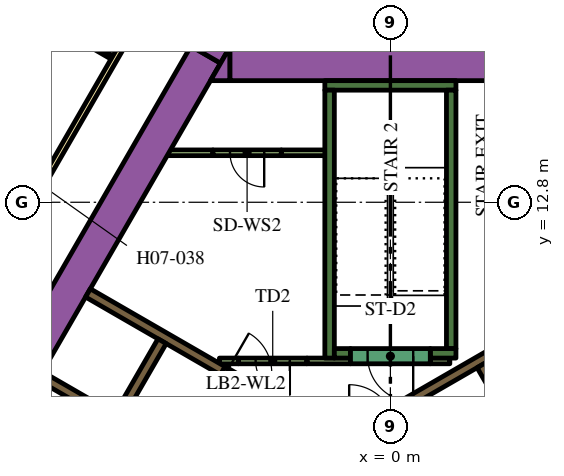
"""IFC4 building model, lengths in metres.
Left out: names, types, materials, properties, quantities, classifications, styles, units other than length and angle.
Written with IfcOpenShell. Run it as: python <this file> out.ifc"""

import sys

from ifc_helpers import new_model, si_unit, direction, frame, frame_2d, origin, place, context, subcontext, project, spatial, polyline, rectangle, outline, extrude, element, fill, save


model = new_model("IFC4")
c1 = context("Model", 3, precision=1e-05, world=origin(), true_north=direction((0.0, 1.0)))
c2 = subcontext(c1, "Body", "Model", "MODEL_VIEW")
j1 = project(units=[si_unit("LENGTHUNIT", "METRE"), si_unit("PLANEANGLEUNIT", "RADIAN")], contexts=[c1])
p1 = place(None, origin())
s1 = spatial("IfcSite", under=j1, at=p1, CompositionType="ELEMENT")
p2 = place(p1, origin())
s2 = spatial("IfcBuilding", under=s1, at=p2, CompositionType="ELEMENT")
p3 = place(p2, frame((0.0, 0.0, 99.3)))
s3 = spatial("IfcBuildingStorey", under=s2, at=p3, CompositionType="ELEMENT", Elevation=99.3)
p4 = place(p3, frame((-15.36, -1.503, 0.0), z_axis=(0.0, 0.0, 1.0), x_axis=(0.50000389221, 0.866023156604, 0.0)))
e1 = element("IfcWall", 1, at=p4, inside=s3, PredefinedType="SOLIDWALL", context=c2, shape_type="SweptSolid", body=[
    extrude(rectangle(XDim=21.0, YDim=0.9, at=frame_2d((10.5, 0.0))), origin(), (0.0, 0.0, 1.0), 3.9),
])
p5 = place(p3, origin())
e2 = element("IfcWall", 2, at=p5, inside=s3, PredefinedType="SOLIDWALL", context=c2, shape_type="SweptSolid", body=[
    extrude(outline(polyline([(-4.215, 16.9), (-4.469, 16.46), (-5.231, 16.9), (-4.215, 16.9)])), origin(), (0.0, 0.0, 1.0), 3.9),
])
p6 = place(p3, frame((-4.224, 16.45, 0.0), z_axis=(0.0, 0.0, 1.0), x_axis=(1.0, 0.0, 0.0)))
e3 = element("IfcWall", 3, at=p6, inside=s3, PredefinedType="SOLIDWALL", context=c2, shape_type="SweptSolid", body=[
    extrude(rectangle(XDim=9.488, YDim=0.9, at=frame_2d((4.744, 0.0))), origin(), (0.0, 0.0, 1.0), 3.9),
])
e4 = element("IfcWall", 4, at=p5, inside=s3, PredefinedType="SOLIDWALL", context=c2, shape_type="SweptSolid", body=[
    extrude(outline(polyline([(-4.734, 16.0), (-4.226, 16.88), (-4.226, 16.0), (-4.734, 16.0)])), origin(), (0.0, 0.0, 1.0), 3.9),
])
p7 = place(p3, frame((-1.725, 15.875, 0.0), z_axis=(0.0, 0.0, 1.0), x_axis=(1.0, 0.0, 0.0)))
e5 = element("IfcWall", 5, at=p7, inside=s3, PredefinedType="SOLIDWALL", context=c2, shape_type="SweptSolid", body=[
    extrude(rectangle(XDim=3.45, YDim=0.25, at=frame_2d((1.725, 0.0))), origin(), (0.0, 0.0, 1.0), 3.9),
])
p8 = place(p3, frame((1.6, 8.95, 0.0), z_axis=(0.0, 0.0, 1.0), x_axis=(0.0, 1.0, 0.0)))
e6 = element("IfcWall", 6, at=p8, inside=s3, PredefinedType="SOLIDWALL", context=c2, shape_type="SweptSolid", body=[
    extrude(rectangle(XDim=6.8, YDim=0.25, at=frame_2d((3.4, 0.0))), origin(), (0.0, 0.0, 1.0), 3.9),
])
p9 = place(p3, frame((1.05, 8.825, 0.0), z_axis=(0.0, 0.0, 1.0), x_axis=(1.0, 0.0, 0.0)))
e7 = element("IfcWall", 7, at=p9, inside=s3, PredefinedType="SOLIDWALL", context=c2, shape_type="SweptSolid", body=[
    extrude(rectangle(XDim=0.675, YDim=0.25, at=frame_2d((0.337, 0.0))), origin(), (0.0, 0.0, 1.0), 3.9),
])
p10 = place(p3, frame((-1.6, 8.7, 0.0), z_axis=(0.0, 0.0, 1.0), x_axis=(0.0, 1.0, 0.0)))
e8 = element("IfcWall", 8, at=p10, inside=s3, PredefinedType="SOLIDWALL", context=c2, shape_type="SweptSolid", body=[
    extrude(rectangle(XDim=7.05, YDim=0.25, at=frame_2d((3.525, 0.0))), origin(), (0.0, 0.0, 1.0), 3.9),
])
p11 = place(p3, frame((-1.475, 8.825, 0.0), z_axis=(0.0, 0.0, 1.0), x_axis=(1.0, 0.0, 0.0)))
e9 = element("IfcWall", 9, at=p11, inside=s3, PredefinedType="SOLIDWALL", context=c2, shape_type="SweptSolid", body=[
    extrude(rectangle(XDim=0.425, YDim=0.25, at=frame_2d((0.212, 0.0))), origin(), (0.0, 0.0, 1.0), 3.9),
])
p12 = place(p3, frame((0.314, 7.456, 0.0), z_axis=(0.0, 0.0, 1.0), x_axis=(0.866013897511, 0.50001992892, 0.0)))
e10 = element("IfcWall", 10, at=p12, inside=s3, PredefinedType="SOLIDWALL", context=c2, shape_type="SweptSolid", body=[
    extrude(rectangle(XDim=3.268, YDim=0.25, at=frame_2d((1.634, 0.0))), origin(), (0.0, 0.0, 1.0), 3.9),
])
e11 = element("IfcWall", 11, at=p5, inside=s3, PredefinedType="SOLIDWALL", context=c2, shape_type="SweptSolid", body=[
    extrude(outline(polyline([(-3.128, 7.481), (-3.259, 7.557), (-3.134, 7.773), (-3.003, 7.698), (-3.128, 7.481)])), origin(), (0.0, 0.0, 1.0), 3.9),
])
p13 = place(p3, frame((-7.314, 7.132, 0.0), z_axis=(0.0, 0.0, 1.0), x_axis=(-0.866008176907, 0.50002983664, 0.0)))
e12 = element("IfcWall", 12, at=p13, inside=s3, PredefinedType="SOLIDWALL", context=c2, shape_type="SweptSolid", body=[
    extrude(rectangle(XDim=2.2, YDim=0.25, at=frame_2d((1.1, 0.0))), origin(), (0.0, 0.0, 1.0), 3.9),
])
p14 = place(p3, frame((-7.959, 10.415, 0.0), z_axis=(0.0, 0.0, 1.0), x_axis=(0.866020958405, -0.500007699544, 0.0)))
e13 = element("IfcWall", 13, at=p14, inside=s3, PredefinedType="SOLIDWALL", context=c2, shape_type="SweptSolid", body=[
    extrude(rectangle(XDim=4.1, YDim=0.25, at=frame_2d((2.05, 0.0))), origin(), (0.0, 0.0, 1.0), 3.9),
])
p15 = place(p3, frame((-3.997, 8.625, 0.0), z_axis=(0.0, 0.0, 1.0), x_axis=(-1.0, 0.0, 0.0)))
e14 = element("IfcWall", 14, at=p15, inside=s3, PredefinedType="PARTITIONING", context=c2, shape_type="SweptSolid", body=[
    extrude(rectangle(XDim=0.502, YDim=0.15, at=frame_2d((0.251, 0.0))), origin(), (0.0, 0.0, 1.0), 2.75),
])
p16 = place(p3, frame((-2.196, 8.625, 0.0), z_axis=(0.0, 0.0, 1.0), x_axis=(1.0, 0.0, 0.0)))
e15 = element("IfcWall", 15, at=p16, inside=s3, PredefinedType="PARTITIONING", context=c2, shape_type="SweptSolid", body=[
    extrude(rectangle(XDim=1.146, YDim=0.15, at=frame_2d((0.573, 0.0))), origin(), (0.0, 0.0, 1.0), 2.75),
])
p17 = place(p3, frame((-5.851, 14.102, 0.0), z_axis=(0.0, 0.0, 1.0), x_axis=(1.0, 0.0, 0.0)))
e16 = element("IfcWall", 16, at=p17, inside=s3, PredefinedType="PARTITIONING", context=c2, shape_type="SweptSolid", body=[
    extrude(rectangle(XDim=1.18, YDim=0.15, at=frame_2d((0.59, 0.0))), origin(), (0.0, 0.0, 1.0), 2.75),
])
p18 = place(p3, frame((-2.871, 14.102, 0.0), z_axis=(0.0, 0.0, 1.0), x_axis=(1.0, 0.0, 0.0)))
e17 = element("IfcWall", 17, at=p18, inside=s3, PredefinedType="PARTITIONING", context=c2, shape_type="SweptSolid", body=[
    extrude(rectangle(XDim=1.196, YDim=0.15, at=frame_2d((0.598, 0.0))), origin(), (0.0, 0.0, 1.0), 2.75),
])
p19 = place(p3, frame((1.05, 8.625, 0.0), z_axis=(0.0, 0.0, 1.0), x_axis=(1.0, 0.0, 0.0)))
e18 = element("IfcWall", 18, at=p19, inside=s3, PredefinedType="PARTITIONING", context=c2, shape_type="SweptSolid", body=[
    extrude(rectangle(XDim=0.514, YDim=0.15, at=frame_2d((0.257, 0.0))), origin(), (0.0, 0.0, 1.0), 2.75),
])
p20 = place(p3, frame((8.565, -2.185, 0.0), z_axis=(0.0, 0.0, 1.0), x_axis=(-0.499997954832, 0.866026584559, 0.0)))
e19 = element("IfcWall", 19, at=p20, inside=s3, PredefinedType="SOLIDWALL", context=c2, shape_type="SweptSolid", body=[
    extrude(rectangle(XDim=12.35, YDim=0.25, at=frame_2d((6.175, 0.0))), origin(), (0.0, 0.0, 1.0), 3.9),
])
p21 = place(p20, frame((5.725, 0.0, 0.0)))
e20 = element("IfcOpeningElement", 20, at=p21, cuts=e19, PredefinedType="OPENING", context=c2, shape_type="SweptSolid", body=[
    extrude(rectangle(XDim=0.9, YDim=2.1, at=frame_2d((0.45, 1.05))), frame((0.0, 0.135, 0.0), z_axis=(0.0, -1.0, 0.0), x_axis=(1.0, 0.0, 0.0)), (0.0, 0.0, 1.0), 0.27),
])
p22 = place(p3, frame((-6.008, 9.144, 0.0), z_axis=(0.0, 0.0, 1.0), x_axis=(-0.500006956611, -0.866021387346, 0.0)))
e21 = element("IfcWall", 21, at=p22, inside=s3, PredefinedType="SOLIDWALL", context=c2, shape_type="SweptSolid", body=[
    extrude(rectangle(XDim=9.83, YDim=0.25, at=frame_2d((4.915, 0.0))), origin(), (0.0, 0.0, 1.0), 3.9),
])
p23 = place(p22, frame((6.985, 0.0, 0.0)))
e22 = element("IfcOpeningElement", 22, at=p23, cuts=e21, PredefinedType="OPENING", context=c2, shape_type="SweptSolid", body=[
    extrude(rectangle(XDim=0.9, YDim=2.1, at=frame_2d((0.45, 1.05))), frame((0.0, 0.135, 0.0), z_axis=(0.0, -1.0, 0.0), x_axis=(1.0, 0.0, 0.0)), (0.0, 0.0, 1.0), 0.27),
])
p24 = place(p3, frame((1.05, 8.75, 0.0), z_axis=(0.0, 0.0, 1.0), x_axis=(-1.0, 0.0, 0.0)))
e23 = element("IfcWall", 23, at=p24, inside=s3, PredefinedType="SOLIDWALL", context=c2, shape_type="SweptSolid", body=[
    extrude(rectangle(XDim=2.1, YDim=0.4, at=frame_2d((1.05, 0.0))), origin(), (0.0, 0.0, 1.0), 3.9),
])
p25 = place(p24, frame((0.45, 0.0, 0.0)))
e24 = element("IfcOpeningElement", 24, at=p25, cuts=e23, PredefinedType="OPENING", context=c2, shape_type="SweptSolid", body=[
    extrude(rectangle(XDim=1.2, YDim=2.1, at=frame_2d((0.6, 1.05))), frame((0.0, 0.21, 0.0), z_axis=(0.0, -1.0, 0.0), x_axis=(1.0, 0.0, 0.0)), (0.0, 0.0, 1.0), 0.42),
])
p26 = place(p3, frame((-2.196, 8.625, 0.0), z_axis=(0.0, 0.0, 1.0), x_axis=(-1.0, 0.0, 0.0)))
e25 = element("IfcWall", 25, at=p26, inside=s3, PredefinedType="PARTITIONING", context=c2, shape_type="SweptSolid", body=[
    extrude(rectangle(XDim=1.8, YDim=0.15, at=frame_2d((0.9, 0.0))), origin(), (0.0, 0.0, 1.0), 2.75),
])
p27 = place(p26, frame((0.45, 0.0, 0.0)))
e26 = element("IfcOpeningElement", 26, at=p27, cuts=e25, PredefinedType="OPENING", context=c2, shape_type="SweptSolid", body=[
    extrude(rectangle(XDim=0.9, YDim=2.1, at=frame_2d((0.45, 1.05))), frame((0.0, 0.085, 0.0), z_axis=(0.0, -1.0, 0.0), x_axis=(1.0, 0.0, 0.0)), (0.0, 0.0, 1.0), 0.17),
])
p28 = place(p3, frame((-4.409, 8.365, 0.0), z_axis=(0.0, 0.0, 1.0), x_axis=(0.866034573852, -0.49998411664, 0.0)))
e27 = element("IfcWall", 27, at=p28, inside=s3, PredefinedType="SOLIDWALL", context=c2, shape_type="SweptSolid", body=[
    extrude(rectangle(XDim=1.4, YDim=0.25, at=frame_2d((0.7, 0.0))), origin(), (0.0, 0.0, 1.0), 3.9),
])
p29 = place(p28, frame((0.1, 0.0, 0.0)))
e28 = element("IfcOpeningElement", 28, at=p29, cuts=e27, PredefinedType="OPENING", context=c2, shape_type="SweptSolid", body=[
    extrude(rectangle(XDim=1.2, YDim=2.1, at=frame_2d((0.6, 1.05))), frame((0.0, 0.135, 0.0), z_axis=(0.0, -1.0, 0.0), x_axis=(1.0, 0.0, 0.0)), (0.0, 0.0, 1.0), 0.27),
])
p30 = place(p3, frame((-2.871, 14.102, 0.0), z_axis=(0.0, 0.0, 1.0), x_axis=(-1.0, 0.0, 0.0)))
e29 = element("IfcWall", 29, at=p30, inside=s3, PredefinedType="PARTITIONING", context=c2, shape_type="SweptSolid", body=[
    extrude(rectangle(XDim=1.8, YDim=0.15, at=frame_2d((0.9, 0.0))), origin(), (0.0, 0.0, 1.0), 2.75),
])
p31 = place(p30, frame((0.45, 0.0, 0.0)))
e30 = element("IfcOpeningElement", 30, at=p31, cuts=e29, PredefinedType="OPENING", context=c2, shape_type="SweptSolid", body=[
    extrude(rectangle(XDim=0.9, YDim=2.1, at=frame_2d((0.45, 1.05))), frame((0.0, 0.085, 0.0), z_axis=(0.0, -1.0, 0.0), x_axis=(1.0, 0.0, 0.0)), (0.0, 0.0, 1.0), 0.17),
])
p32 = place(p3, frame((-19.081, -3.9, 0.0), z_axis=(0.0, 0.0, 1.0), x_axis=(0.499998313975, 0.866026377209, 0.0)))
e31 = element("IfcWall", 31, at=p32, inside=s3, PredefinedType="PARTITIONING", context=c2, shape_type="SweptSolid", body=[
    extrude(rectangle(XDim=25.766, YDim=0.15, at=frame_2d((12.883, 0.0))), origin(), (0.0, 0.0, 1.0), 2.75),
])
p33 = place(p32, frame((19.306, 0.0, 0.0)))
e32 = element("IfcOpeningElement", 32, at=p33, cuts=e31, PredefinedType="OPENING", context=c2, shape_type="SweptSolid", body=[
    extrude(rectangle(XDim=1.0, YDim=2.1, at=frame_2d((0.5, 1.05))), frame((0.0, 0.085, 0.0), z_axis=(0.0, -1.0, 0.0), x_axis=(1.0, 0.0, 0.0)), (0.0, 0.0, 1.0), 0.17),
])
p34 = place(p32, frame((17.144, 0.0, 0.0)))
e33 = element("IfcOpeningElement", 33, at=p34, cuts=e31, PredefinedType="OPENING", context=c2, shape_type="SweptSolid", body=[
    extrude(rectangle(XDim=0.9, YDim=2.1, at=frame_2d((0.45, 1.05))), frame((0.0, 0.085, 0.0), z_axis=(0.0, -1.0, 0.0), x_axis=(1.0, 0.0, 0.0)), (0.0, 0.0, 1.0), 0.17),
])
p35 = place(p32, frame((9.955, 0.0, 0.0)))
e34 = element("IfcOpeningElement", 34, at=p35, cuts=e31, PredefinedType="OPENING", context=c2, shape_type="SweptSolid", body=[
    extrude(rectangle(XDim=1.1, YDim=2.1, at=frame_2d((0.55, 1.05))), frame((0.0, 0.085, 0.0), z_axis=(0.0, -1.0, 0.0), x_axis=(1.0, 0.0, 0.0)), (0.0, 0.0, 1.0), 0.17),
])
p36 = place(p32, frame((8.648, 0.0, 0.0)))
e35 = element("IfcOpeningElement", 35, at=p36, cuts=e31, PredefinedType="OPENING", context=c2, shape_type="SweptSolid", body=[
    extrude(rectangle(XDim=1.0, YDim=2.1, at=frame_2d((0.5, 1.05))), frame((0.0, 0.085, 0.0), z_axis=(0.0, -1.0, 0.0), x_axis=(1.0, 0.0, 0.0)), (0.0, 0.0, 1.0), 0.17),
])
p37 = place(p32, frame((1.553, 0.0, 0.0)))
e36 = element("IfcOpeningElement", 36, at=p37, cuts=e31, PredefinedType="OPENING", context=c2, shape_type="SweptSolid", body=[
    extrude(rectangle(XDim=0.9, YDim=2.1, at=frame_2d((0.45, 1.05))), frame((0.0, 0.085, 0.0), z_axis=(0.0, -1.0, 0.0), x_axis=(1.0, 0.0, 0.0)), (0.0, 0.0, 1.0), 0.17),
])
p38 = place(p3, frame((-9.578, 17.911, 0.0), z_axis=(0.0, 0.0, 1.0), x_axis=(0.866021400173, -0.500006934395, 0.0)))
e37 = element("IfcWall", 37, at=p38, inside=s3, PredefinedType="PARTITIONING", context=c2, shape_type="SweptSolid", body=[
    extrude(rectangle(XDim=2.6, YDim=0.1, at=frame_2d((1.3, 0.0))), origin(), (0.0, 0.0, 1.0), 2.75),
])
p39 = place(p38, frame((1.1, 0.0, 0.0)))
e38 = element("IfcOpeningElement", 38, at=p39, cuts=e37, PredefinedType="OPENING", context=c2, shape_type="SweptSolid", body=[
    extrude(rectangle(XDim=0.9, YDim=2.1, at=frame_2d((0.45, 1.05))), frame((0.0, 0.06, 0.0), z_axis=(0.0, -1.0, 0.0), x_axis=(1.0, 0.0, 0.0)), (0.0, 0.0, 1.0), 0.12),
])
p40 = place(p25, origin())
e39 = element("IfcDoor", 39, at=p40, inside=s3, OperationType="SINGLE_SWING_LEFT", PredefinedType="DOOR", context=c2, shape_type="SweptSolid", body=[
    extrude(rectangle(XDim=1.2, YDim=2.1, at=frame_2d((0.6, 1.05))), frame((0.0, 0.025, 0.0), z_axis=(0.0, -1.0, 0.0), x_axis=(1.0, 0.0, 0.0)), (0.0, 0.0, 1.0), 0.05),
])
fill(e24, e39)
p41 = place(p27, origin())
e40 = element("IfcDoor", 40, at=p41, inside=s3, OperationType="SINGLE_SWING_LEFT", PredefinedType="DOOR", context=c2, shape_type="SweptSolid", body=[
    extrude(rectangle(XDim=0.9, YDim=2.1, at=frame_2d((0.45, 1.05))), frame((0.0, 0.025, 0.0), z_axis=(0.0, -1.0, 0.0), x_axis=(1.0, 0.0, 0.0)), (0.0, 0.0, 1.0), 0.05),
])
fill(e26, e40)
p42 = place(p29, origin())
e41 = element("IfcDoor", 41, at=p42, inside=s3, OperationType="SINGLE_SWING_LEFT", PredefinedType="DOOR", context=c2, shape_type="SweptSolid", body=[
    extrude(rectangle(XDim=1.2, YDim=2.1, at=frame_2d((0.6, 1.05))), frame((0.0, 0.025, 0.0), z_axis=(0.0, -1.0, 0.0), x_axis=(1.0, 0.0, 0.0)), (0.0, 0.0, 1.0), 0.05),
])
fill(e28, e41)
p43 = place(p31, origin())
e42 = element("IfcDoor", 42, at=p43, inside=s3, OperationType="SINGLE_SWING_LEFT", PredefinedType="DOOR", context=c2, shape_type="SweptSolid", body=[
    extrude(rectangle(XDim=0.9, YDim=2.1, at=frame_2d((0.45, 1.05))), frame((0.0, 0.025, 0.0), z_axis=(0.0, -1.0, 0.0), x_axis=(1.0, 0.0, 0.0)), (0.0, 0.0, 1.0), 0.05),
])
fill(e30, e42)
save(model, sys.argv[1])
